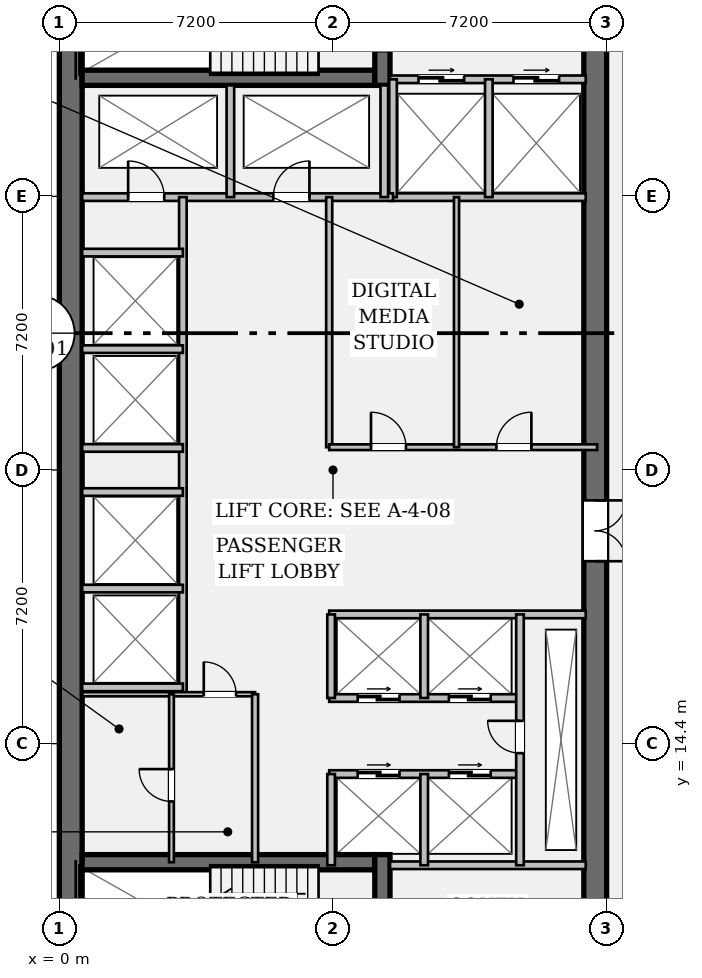
"""IFC4 building model, lengths in metres.
Left out: names, types, materials, properties, quantities, classifications, styles, units other than length and angle.
Written with IfcOpenShell. Run it as: python <this file> out.ifc"""

import sys

from ifc_helpers import new_model, si_unit, direction, frame, frame_2d, origin, place, context, subcontext, project, spatial, rectangle, extrude, element, fill, save


model = new_model("IFC4")
c1 = context("Model", 3, precision=1e-05, world=origin(), true_north=direction((0.0, 1.0)))
c2 = subcontext(c1, "Body", "Model", "MODEL_VIEW")
j1 = project(units=[si_unit("LENGTHUNIT", "METRE"), si_unit("PLANEANGLEUNIT", "RADIAN")], contexts=[c1])
p1 = place(None, origin())
s1 = spatial("IfcSite", under=j1, at=p1, CompositionType="ELEMENT")
p2 = place(p1, origin())
s2 = spatial("IfcBuilding", under=s1, at=p2, CompositionType="ELEMENT")
p3 = place(p2, frame((0.0, 0.0, 109.9)))
s3 = spatial("IfcBuildingStorey", under=s2, at=p3, CompositionType="ELEMENT", Elevation=109.9)
p4 = place(p3, frame((0.3, 7.2, 0.0), z_axis=(0.0, 0.0, 1.0), x_axis=(0.0, 1.0, 0.0)))
e1 = element("IfcWall", 1, at=p4, inside=s3, PredefinedType="SHEAR", context=c2, shape_type="SweptSolid", body=[
    extrude(rectangle(XDim=28.8, YDim=0.6, at=frame_2d((14.4, 0.0))), origin(), (0.0, 0.0, 1.0), 3.58),
])
p5 = place(p3, frame((14.1, 35.4, 0.0), z_axis=(0.0, 0.0, 1.0), x_axis=(0.0, -1.0, 0.0)))
e2 = element("IfcWall", 2, at=p5, inside=s3, PredefinedType="SHEAR", context=c2, shape_type="SweptSolid", body=[
    extrude(rectangle(XDim=27.6, YDim=0.6, at=frame_2d((13.8, 0.0))), origin(), (0.0, 0.0, 1.0), 3.58),
])
p6 = place(p5, frame((1.3, 0.0, 0.0)))
e3 = element("IfcOpeningElement", 3, at=p6, cuts=e2, PredefinedType="OPENING", context=c2, shape_type="SweptSolid", body=[
    extrude(rectangle(XDim=1.2, YDim=2.15, at=frame_2d((0.6, 1.075))), frame((0.0, 0.312, 0.0), z_axis=(0.0, -1.0, 0.0), x_axis=(1.0, 0.0, 0.0)), (0.0, 0.0, 1.0), 0.624),
])
p7 = place(p5, frame((25.25, 0.0, 0.0)))
e4 = element("IfcOpeningElement", 4, at=p7, cuts=e2, PredefinedType="OPENING", context=c2, shape_type="SweptSolid", body=[
    extrude(rectangle(XDim=1.2, YDim=2.15, at=frame_2d((0.6, 1.075))), frame((0.0, 0.312, 0.0), z_axis=(0.0, -1.0, 0.0), x_axis=(1.0, 0.0, 0.0)), (0.0, 0.0, 1.0), 0.624),
])
p8 = place(p5, frame((14.6, 0.0, 0.0)))
e5 = element("IfcOpeningElement", 5, at=p8, cuts=e2, PredefinedType="OPENING", context=c2, shape_type="SweptSolid", body=[
    extrude(rectangle(XDim=1.6, YDim=2.2, at=frame_2d((0.8, 1.1))), frame((0.0, 0.312, 0.0), z_axis=(0.0, -1.0, 0.0), x_axis=(1.0, 0.0, 0.0)), (0.0, 0.0, 1.0), 0.624),
])
for number, where, z_axis, x_axis in (
    (6, (0.6, 31.92, 0.0), (0.0, 0.0, 1.0), (1.0, 0.0, 0.0)),
    (7, (0.6, 11.28, 0.0), (0.0, 0.0, 1.0), (1.0, 0.0, 0.0)),
):
    element("IfcWall", number, at=place(p3, frame(where, z_axis=z_axis, x_axis=x_axis)), inside=s3, PredefinedType="SHEAR", context=c2, shape_type="SweptSolid", body=[
        extrude(rectangle(XDim=7.7, YDim=0.4, at=frame_2d((3.85, 0.0))), origin(), (0.0, 0.0, 1.0), 3.58),
    ])
p9 = place(p3, frame((8.5, 31.72, 0.0), z_axis=(0.0, 0.0, 1.0), x_axis=(0.0, 1.0, 0.0)))
e8 = element("IfcWall", 8, at=p9, inside=s3, PredefinedType="SHEAR", context=c2, shape_type="SweptSolid", body=[
    extrude(rectangle(XDim=3.68, YDim=0.4, at=frame_2d((1.84, 0.0))), origin(), (0.0, 0.0, 1.0), 3.58),
])
p10 = place(p9, frame((0.9, 0.0, 0.0)))
e9 = element("IfcOpeningElement", 9, at=p10, cuts=e8, PredefinedType="OPENING", context=c2, shape_type="SweptSolid", body=[
    extrude(rectangle(XDim=1.1, YDim=2.15, at=frame_2d((0.55, 1.075))), frame((0.0, 0.212, 0.0), z_axis=(0.0, -1.0, 0.0), x_axis=(1.0, 0.0, 0.0)), (0.0, 0.0, 1.0), 0.424),
])
p11 = place(p3, frame((8.5, 7.8, 0.0), z_axis=(0.0, 0.0, 1.0), x_axis=(0.0, 1.0, 0.0)))
e10 = element("IfcWall", 10, at=p11, inside=s3, PredefinedType="SHEAR", context=c2, shape_type="SweptSolid", body=[
    extrude(rectangle(XDim=3.68, YDim=0.4, at=frame_2d((1.84, 0.0))), origin(), (0.0, 0.0, 1.0), 3.58),
])
p12 = place(p11, frame((0.85, 0.0, 0.0)))
e11 = element("IfcOpeningElement", 11, at=p12, cuts=e10, PredefinedType="OPENING", context=c2, shape_type="SweptSolid", body=[
    extrude(rectangle(XDim=1.1, YDim=2.15, at=frame_2d((0.55, 1.075))), frame((0.0, 0.212, 0.0), z_axis=(0.0, -1.0, 0.0), x_axis=(1.0, 0.0, 0.0)), (0.0, 0.0, 1.0), 0.424),
])
p13 = place(p3, frame((8.7, 31.88, 0.0), z_axis=(0.0, 0.0, 1.0), x_axis=(1.0, 0.0, 0.0)))
e12 = element("IfcWall", 12, at=p13, inside=s3, PredefinedType="PARTITIONING", context=c2, shape_type="SweptSolid", body=[
    extrude(rectangle(XDim=5.15, YDim=0.2, at=frame_2d((2.575, 0.0))), origin(), (0.0, 0.0, 1.0), 3.58),
])
p14 = place(p13, frame((0.75, 0.0, 0.0)))
e13 = element("IfcOpeningElement", 13, at=p14, cuts=e12, PredefinedType="OPENING", context=c2, shape_type="SweptSolid", body=[
    extrude(rectangle(XDim=1.2, YDim=2.2, at=frame_2d((0.6, 1.1))), frame((0.0, 0.112, 0.0), z_axis=(0.0, -1.0, 0.0), x_axis=(1.0, 0.0, 0.0)), (0.0, 0.0, 1.0), 0.224),
])
p15 = place(p13, frame((3.25, 0.0, 0.0)))
e14 = element("IfcOpeningElement", 14, at=p15, cuts=e12, PredefinedType="OPENING", context=c2, shape_type="SweptSolid", body=[
    extrude(rectangle(XDim=1.2, YDim=2.2, at=frame_2d((0.6, 1.1))), frame((0.0, 0.112, 0.0), z_axis=(0.0, -1.0, 0.0), x_axis=(1.0, 0.0, 0.0)), (0.0, 0.0, 1.0), 0.224),
])
for number, where, z_axis, x_axis in (
    (15, (8.7, 11.2, 0.0), (0.0, 0.0, 1.0), (1.0, 0.0, 0.0)),
    (16, (8.7, 28.78, 0.0), (0.0, 0.0, 1.0), (1.0, 0.0, 0.0)),
):
    element("IfcWall", number, at=place(p3, frame(where, z_axis=z_axis, x_axis=x_axis)), inside=s3, PredefinedType="PARTITIONING", context=c2, shape_type="SweptSolid", body=[
        extrude(rectangle(XDim=5.15, YDim=0.2, at=frame_2d((2.575, 0.0))), origin(), (0.0, 0.0, 1.0), 3.58),
    ])
for number, where, z_axis, x_axis in (
    (17, (8.78, 28.78, 0.0), (0.0, 0.0, 1.0), (0.0, 1.0, 0.0)),
    (18, (11.3, 28.78, 0.0), (0.0, 0.0, 1.0), (0.0, 1.0, 0.0)),
):
    element("IfcWall", number, at=place(p3, frame(where, z_axis=z_axis, x_axis=x_axis)), inside=s3, PredefinedType="PARTITIONING", context=c2, shape_type="SweptSolid", body=[
        extrude(rectangle(XDim=3.1, YDim=0.2, at=frame_2d((1.55, 0.0))), origin(), (0.0, 0.0, 1.0), 3.58),
    ])
p16 = place(p3, frame((0.6, 28.78, 0.0), z_axis=(0.0, 0.0, 1.0), x_axis=(1.0, 0.0, 0.0)))
e19 = element("IfcWall", 19, at=p16, inside=s3, PredefinedType="PARTITIONING", context=c2, shape_type="SweptSolid", body=[
    extrude(rectangle(XDim=8.18, YDim=0.2, at=frame_2d((4.09, 0.0))), origin(), (0.0, 0.0, 1.0), 3.58),
])
p17 = place(p16, frame((1.21, 0.0, 0.0)))
e20 = element("IfcOpeningElement", 20, at=p17, cuts=e19, PredefinedType="OPENING", context=c2, shape_type="SweptSolid", body=[
    extrude(rectangle(XDim=0.95, YDim=2.15, at=frame_2d((0.475, 1.075))), frame((0.0, 0.112, 0.0), z_axis=(0.0, -1.0, 0.0), x_axis=(1.0, 0.0, 0.0)), (0.0, 0.0, 1.0), 0.224),
])
p18 = place(p16, frame((5.03, 0.0, 0.0)))
e21 = element("IfcOpeningElement", 21, at=p18, cuts=e19, PredefinedType="OPENING", context=c2, shape_type="SweptSolid", body=[
    extrude(rectangle(XDim=0.95, YDim=2.15, at=frame_2d((0.475, 1.075))), frame((0.0, 0.112, 0.0), z_axis=(0.0, -1.0, 0.0), x_axis=(1.0, 0.0, 0.0)), (0.0, 0.0, 1.0), 0.224),
])
for number, where, z_axis, x_axis in (
    (22, (4.5, 28.78, 0.0), (0.0, 0.0, 1.0), (0.0, 1.0, 0.0)),
    (23, (8.55, 28.78, 0.0), (0.0, 0.0, 1.0), (0.0, 1.0, 0.0)),
):
    element("IfcWall", number, at=place(p3, frame(where, z_axis=z_axis, x_axis=x_axis)), inside=s3, PredefinedType="PARTITIONING", context=c2, shape_type="SweptSolid", body=[
        extrude(rectangle(XDim=2.94, YDim=0.2, at=frame_2d((1.47, 0.0))), origin(), (0.0, 0.0, 1.0), 3.58),
    ])
p19 = place(p3, frame((3.25, 15.7, 0.0), z_axis=(0.0, 0.0, 1.0), x_axis=(0.0, 1.0, 0.0)))
e24 = element("IfcWall", 24, at=p19, inside=s3, PredefinedType="PARTITIONING", context=c2, shape_type="SweptSolid", body=[
    extrude(rectangle(XDim=13.08, YDim=0.2, at=frame_2d((6.54, 0.0))), origin(), (0.0, 0.0, 1.0), 3.58),
])
for number, where, z_axis, x_axis in (
    (25, (0.6, 15.88, 0.0), (0.0, 0.0, 1.0), (1.0, 0.0, 0.0)),
    (26, (0.6, 18.48, 0.0), (0.0, 0.0, 1.0), (1.0, 0.0, 0.0)),
    (27, (0.6, 22.18, 0.0), (0.0, 0.0, 1.0), (1.0, 0.0, 0.0)),
    (28, (0.6, 24.78, 0.0), (0.0, 0.0, 1.0), (1.0, 0.0, 0.0)),
    (29, (0.6, 21.02, 0.0), (0.0, 0.0, 1.0), (1.0, 0.0, 0.0)),
    (30, (0.6, 27.32, 0.0), (0.0, 0.0, 1.0), (1.0, 0.0, 0.0)),
):
    element("IfcWall", number, at=place(p3, frame(where, z_axis=z_axis, x_axis=x_axis)), inside=s3, PredefinedType="PARTITIONING", context=c2, shape_type="SweptSolid", body=[
        extrude(rectangle(XDim=2.65, YDim=0.2, at=frame_2d((1.325, 0.0))), origin(), (0.0, 0.0, 1.0), 3.58),
    ])
p20 = place(p3, frame((7.1, 22.2, 0.0), z_axis=(0.0, 0.0, 1.0), x_axis=(0.0, 1.0, 0.0)))
e31 = element("IfcWall", 31, at=p20, inside=s3, PredefinedType="PARTITIONING", context=c2, shape_type="SweptSolid", body=[
    extrude(rectangle(XDim=6.58, YDim=0.16, at=frame_2d((3.29, 0.0))), origin(), (0.0, 0.0, 1.0), 3.58),
])
p21 = place(p3, frame((7.1, 22.2, 0.0), z_axis=(0.0, 0.0, 1.0), x_axis=(1.0, 0.0, 0.0)))
e32 = element("IfcWall", 32, at=p21, inside=s3, PredefinedType="PARTITIONING", context=c2, shape_type="SweptSolid", body=[
    extrude(rectangle(XDim=7.05, YDim=0.15, at=frame_2d((3.525, 0.0))), origin(), (0.0, 0.0, 1.0), 3.58),
])
p22 = place(p21, frame((1.1, 0.0, 0.0)))
e33 = element("IfcOpeningElement", 33, at=p22, cuts=e32, PredefinedType="OPENING", context=c2, shape_type="SweptSolid", body=[
    extrude(rectangle(XDim=0.92, YDim=2.15, at=frame_2d((0.46, 1.075))), frame((0.0, 0.087, 0.0), z_axis=(0.0, -1.0, 0.0), x_axis=(1.0, 0.0, 0.0)), (0.0, 0.0, 1.0), 0.174),
])
p23 = place(p21, frame((4.4, 0.0, 0.0)))
e34 = element("IfcOpeningElement", 34, at=p23, cuts=e32, PredefinedType="OPENING", context=c2, shape_type="SweptSolid", body=[
    extrude(rectangle(XDim=0.92, YDim=2.15, at=frame_2d((0.46, 1.075))), frame((0.0, 0.087, 0.0), z_axis=(0.0, -1.0, 0.0), x_axis=(1.0, 0.0, 0.0)), (0.0, 0.0, 1.0), 0.174),
])
p24 = place(p3, frame((10.45, 22.2, 0.0), z_axis=(0.0, 0.0, 1.0), x_axis=(0.0, 1.0, 0.0)))
e35 = element("IfcWall", 35, at=p24, inside=s3, PredefinedType="PARTITIONING", context=c2, shape_type="SweptSolid", body=[
    extrude(rectangle(XDim=6.58, YDim=0.135, at=frame_2d((3.29, 0.0))), origin(), (0.0, 0.0, 1.0), 3.58),
])
p25 = place(p3, frame((7.1, 17.8, 0.0), z_axis=(0.0, 0.0, 1.0), x_axis=(1.0, 0.0, 0.0)))
e36 = element("IfcWall", 36, at=p25, inside=s3, PredefinedType="PARTITIONING", context=c2, shape_type="SweptSolid", body=[
    extrude(rectangle(XDim=6.75, YDim=0.2, at=frame_2d((3.375, 0.0))), origin(), (0.0, 0.0, 1.0), 3.58),
])
p26 = place(p3, frame((7.1, 15.6, 0.0), z_axis=(0.0, 0.0, 1.0), x_axis=(1.0, 0.0, 0.0)))
e37 = element("IfcWall", 37, at=p26, inside=s3, PredefinedType="PARTITIONING", context=c2, shape_type="SweptSolid", body=[
    extrude(rectangle(XDim=5.02, YDim=0.2, at=frame_2d((2.51, 0.0))), origin(), (0.0, 0.0, 1.0), 3.58),
])
p27 = place(p26, frame((0.75, 0.0, 0.0)))
e38 = element("IfcOpeningElement", 38, at=p27, cuts=e37, PredefinedType="OPENING", context=c2, shape_type="SweptSolid", body=[
    extrude(rectangle(XDim=1.1, YDim=2.2, at=frame_2d((0.55, 1.1))), frame((0.0, 0.112, 0.0), z_axis=(0.0, -1.0, 0.0), x_axis=(1.0, 0.0, 0.0)), (0.0, 0.0, 1.0), 0.224),
])
p28 = place(p26, frame((3.15, 0.0, 0.0)))
e39 = element("IfcOpeningElement", 39, at=p28, cuts=e37, PredefinedType="OPENING", context=c2, shape_type="SweptSolid", body=[
    extrude(rectangle(XDim=1.1, YDim=2.2, at=frame_2d((0.55, 1.1))), frame((0.0, 0.112, 0.0), z_axis=(0.0, -1.0, 0.0), x_axis=(1.0, 0.0, 0.0)), (0.0, 0.0, 1.0), 0.224),
])
p29 = place(p3, frame((7.1, 13.6, 0.0), z_axis=(0.0, 0.0, 1.0), x_axis=(1.0, 0.0, 0.0)))
e40 = element("IfcWall", 40, at=p29, inside=s3, PredefinedType="PARTITIONING", context=c2, shape_type="SweptSolid", body=[
    extrude(rectangle(XDim=5.02, YDim=0.2, at=frame_2d((2.51, 0.0))), origin(), (0.0, 0.0, 1.0), 3.58),
])
p30 = place(p29, frame((0.75, 0.0, 0.0)))
e41 = element("IfcOpeningElement", 41, at=p30, cuts=e40, PredefinedType="OPENING", context=c2, shape_type="SweptSolid", body=[
    extrude(rectangle(XDim=1.1, YDim=2.2, at=frame_2d((0.55, 1.1))), frame((0.0, 0.112, 0.0), z_axis=(0.0, -1.0, 0.0), x_axis=(1.0, 0.0, 0.0)), (0.0, 0.0, 1.0), 0.224),
])
p31 = place(p29, frame((3.15, 0.0, 0.0)))
e42 = element("IfcOpeningElement", 42, at=p31, cuts=e40, PredefinedType="OPENING", context=c2, shape_type="SweptSolid", body=[
    extrude(rectangle(XDim=1.1, YDim=2.2, at=frame_2d((0.55, 1.1))), frame((0.0, 0.112, 0.0), z_axis=(0.0, -1.0, 0.0), x_axis=(1.0, 0.0, 0.0)), (0.0, 0.0, 1.0), 0.224),
])
p32 = place(p3, frame((7.15, 15.6, 0.0), z_axis=(0.0, 0.0, 1.0), x_axis=(0.0, 1.0, 0.0)))
e43 = element("IfcWall", 43, at=p32, inside=s3, PredefinedType="PARTITIONING", context=c2, shape_type="SweptSolid", body=[
    extrude(rectangle(XDim=2.2, YDim=0.2, at=frame_2d((1.1, 0.0))), origin(), (0.0, 0.0, 1.0), 3.58),
])
p33 = place(p3, frame((7.15, 11.2, 0.0), z_axis=(0.0, 0.0, 1.0), x_axis=(0.0, 1.0, 0.0)))
e44 = element("IfcWall", 44, at=p33, inside=s3, PredefinedType="PARTITIONING", context=c2, shape_type="SweptSolid", body=[
    extrude(rectangle(XDim=2.4, YDim=0.2, at=frame_2d((1.2, 0.0))), origin(), (0.0, 0.0, 1.0), 3.58),
])
p34 = place(p3, frame((9.6, 15.6, 0.0), z_axis=(0.0, 0.0, 1.0), x_axis=(0.0, 1.0, 0.0)))
e45 = element("IfcWall", 45, at=p34, inside=s3, PredefinedType="PARTITIONING", context=c2, shape_type="SweptSolid", body=[
    extrude(rectangle(XDim=2.2, YDim=0.2, at=frame_2d((1.1, 0.0))), origin(), (0.0, 0.0, 1.0), 3.58),
])
p35 = place(p3, frame((9.6, 11.2, 0.0), z_axis=(0.0, 0.0, 1.0), x_axis=(0.0, 1.0, 0.0)))
e46 = element("IfcWall", 46, at=p35, inside=s3, PredefinedType="PARTITIONING", context=c2, shape_type="SweptSolid", body=[
    extrude(rectangle(XDim=2.4, YDim=0.2, at=frame_2d((1.2, 0.0))), origin(), (0.0, 0.0, 1.0), 3.58),
])
p36 = place(p3, frame((12.12, 11.2, 0.0), z_axis=(0.0, 0.0, 1.0), x_axis=(0.0, 1.0, 0.0)))
e47 = element("IfcWall", 47, at=p36, inside=s3, PredefinedType="PARTITIONING", context=c2, shape_type="SweptSolid", body=[
    extrude(rectangle(XDim=6.6, YDim=0.2, at=frame_2d((3.3, 0.0))), origin(), (0.0, 0.0, 1.0), 3.58),
])
p37 = place(p36, frame((2.95, 0.0, 0.0)))
e48 = element("IfcOpeningElement", 48, at=p37, cuts=e47, PredefinedType="OPENING", context=c2, shape_type="SweptSolid", body=[
    extrude(rectangle(XDim=0.85, YDim=2.15, at=frame_2d((0.425, 1.075))), frame((0.0, 0.112, 0.0), z_axis=(0.0, -1.0, 0.0), x_axis=(1.0, 0.0, 0.0)), (0.0, 0.0, 1.0), 0.224),
])
p38 = place(p3, frame((0.6, 15.7, 0.0), z_axis=(0.0, 0.0, 1.0), x_axis=(1.0, 0.0, 0.0)))
e49 = element("IfcWall", 49, at=p38, inside=s3, PredefinedType="PARTITIONING", context=c2, shape_type="SweptSolid", body=[
    extrude(rectangle(XDim=4.55, YDim=0.11, at=frame_2d((2.275, 0.0))), origin(), (0.0, 0.0, 1.0), 3.58),
])
p39 = place(p38, frame((3.2, 0.0, 0.0)))
e50 = element("IfcOpeningElement", 50, at=p39, cuts=e49, PredefinedType="OPENING", context=c2, shape_type="SweptSolid", body=[
    extrude(rectangle(XDim=0.85, YDim=2.15, at=frame_2d((0.425, 1.075))), frame((0.0, 0.067, 0.0), z_axis=(0.0, -1.0, 0.0), x_axis=(1.0, 0.0, 0.0)), (0.0, 0.0, 1.0), 0.134),
])
p40 = place(p3, frame((5.15, 11.28, 0.0), z_axis=(0.0, 0.0, 1.0), x_axis=(0.0, 1.0, 0.0)))
e51 = element("IfcWall", 51, at=p40, inside=s3, PredefinedType="PARTITIONING", context=c2, shape_type="SweptSolid", body=[
    extrude(rectangle(XDim=4.42, YDim=0.16, at=frame_2d((2.21, 0.0))), origin(), (0.0, 0.0, 1.0), 3.58),
])
p41 = place(p3, frame((2.95, 11.28, 0.0), z_axis=(0.0, 0.0, 1.0), x_axis=(0.0, 1.0, 0.0)))
e52 = element("IfcWall", 52, at=p41, inside=s3, PredefinedType="PARTITIONING", context=c2, shape_type="SweptSolid", body=[
    extrude(rectangle(XDim=4.42, YDim=0.125, at=frame_2d((2.21, 0.0))), origin(), (0.0, 0.0, 1.0), 3.58),
])
p42 = place(p41, frame((1.6, 0.0, 0.0)))
e53 = element("IfcOpeningElement", 53, at=p42, cuts=e52, PredefinedType="OPENING", context=c2, shape_type="SweptSolid", body=[
    extrude(rectangle(XDim=0.85, YDim=2.15, at=frame_2d((0.425, 1.075))), frame((0.0, 0.074, 0.0), z_axis=(0.0, -1.0, 0.0), x_axis=(1.0, 0.0, 0.0)), (0.0, 0.0, 1.0), 0.149),
])
p43 = place(p14, origin())
e54 = element("IfcDoor", 54, at=p43, inside=s3, OperationType="DOUBLE_DOOR_SLIDING", PredefinedType="DOOR", context=c2, shape_type="SweptSolid", body=[
    extrude(rectangle(XDim=1.2, YDim=2.2, at=frame_2d((0.6, 1.1))), frame((0.0, 0.025, 0.0), z_axis=(0.0, -1.0, 0.0), x_axis=(1.0, 0.0, 0.0)), (0.0, 0.0, 1.0), 0.05),
])
fill(e13, e54)
p44 = place(p15, origin())
e55 = element("IfcDoor", 55, at=p44, inside=s3, OperationType="DOUBLE_DOOR_SLIDING", PredefinedType="DOOR", context=c2, shape_type="SweptSolid", body=[
    extrude(rectangle(XDim=1.2, YDim=2.2, at=frame_2d((0.6, 1.1))), frame((0.0, 0.025, 0.0), z_axis=(0.0, -1.0, 0.0), x_axis=(1.0, 0.0, 0.0)), (0.0, 0.0, 1.0), 0.05),
])
fill(e14, e55)
p45 = place(p17, origin())
e56 = element("IfcDoor", 56, at=p45, inside=s3, OperationType="SINGLE_SWING_LEFT", PredefinedType="DOOR", context=c2, shape_type="SweptSolid", body=[
    extrude(rectangle(XDim=0.95, YDim=2.15, at=frame_2d((0.475, 1.075))), frame((0.0, 0.025, 0.0), z_axis=(0.0, -1.0, 0.0), x_axis=(1.0, 0.0, 0.0)), (0.0, 0.0, 1.0), 0.05),
])
fill(e20, e56)
p46 = place(p18, origin())
e57 = element("IfcDoor", 57, at=p46, inside=s3, OperationType="SINGLE_SWING_RIGHT", PredefinedType="DOOR", context=c2, shape_type="SweptSolid", body=[
    extrude(rectangle(XDim=0.95, YDim=2.15, at=frame_2d((0.475, 1.075))), frame((0.0, 0.025, 0.0), z_axis=(0.0, -1.0, 0.0), x_axis=(1.0, 0.0, 0.0)), (0.0, 0.0, 1.0), 0.05),
])
fill(e21, e57)
p47 = place(p8, origin())
e58 = element("IfcDoor", 58, at=p47, inside=s3, OperationType="DOUBLE_DOOR_SINGLE_SWING", PredefinedType="DOOR", context=c2, shape_type="SweptSolid", body=[
    extrude(rectangle(XDim=1.6, YDim=2.2, at=frame_2d((0.8, 1.1))), frame((0.0, 0.025, 0.0), z_axis=(0.0, -1.0, 0.0), x_axis=(1.0, 0.0, 0.0)), (0.0, 0.0, 1.0), 0.05),
])
fill(e5, e58)
p48 = place(p22, origin())
e59 = element("IfcDoor", 59, at=p48, inside=s3, OperationType="SINGLE_SWING_LEFT", PredefinedType="DOOR", context=c2, shape_type="SweptSolid", body=[
    extrude(rectangle(XDim=0.92, YDim=2.15, at=frame_2d((0.46, 1.075))), frame((0.0, 0.025, 0.0), z_axis=(0.0, -1.0, 0.0), x_axis=(1.0, 0.0, 0.0)), (0.0, 0.0, 1.0), 0.05),
])
fill(e33, e59)
p49 = place(p23, origin())
e60 = element("IfcDoor", 60, at=p49, inside=s3, OperationType="SINGLE_SWING_RIGHT", PredefinedType="DOOR", context=c2, shape_type="SweptSolid", body=[
    extrude(rectangle(XDim=0.92, YDim=2.15, at=frame_2d((0.46, 1.075))), frame((0.0, 0.025, 0.0), z_axis=(0.0, -1.0, 0.0), x_axis=(1.0, 0.0, 0.0)), (0.0, 0.0, 1.0), 0.05),
])
fill(e34, e60)
p50 = place(p37, origin())
e61 = element("IfcDoor", 61, at=p50, inside=s3, OperationType="SINGLE_SWING_RIGHT", PredefinedType="DOOR", context=c2, shape_type="SweptSolid", body=[
    extrude(rectangle(XDim=0.85, YDim=2.15, at=frame_2d((0.425, 1.075))), frame((0.0, 0.025, 0.0), z_axis=(0.0, -1.0, 0.0), x_axis=(1.0, 0.0, 0.0)), (0.0, 0.0, 1.0), 0.05),
])
fill(e48, e61)
p51 = place(p27, origin())
e62 = element("IfcDoor", 62, at=p51, inside=s3, OperationType="DOUBLE_DOOR_SLIDING", PredefinedType="DOOR", context=c2, shape_type="SweptSolid", body=[
    extrude(rectangle(XDim=1.1, YDim=2.2, at=frame_2d((0.55, 1.1))), frame((0.0, 0.025, 0.0), z_axis=(0.0, -1.0, 0.0), x_axis=(1.0, 0.0, 0.0)), (0.0, 0.0, 1.0), 0.05),
])
fill(e38, e62)
p52 = place(p28, origin())
e63 = element("IfcDoor", 63, at=p52, inside=s3, OperationType="DOUBLE_DOOR_SLIDING", PredefinedType="DOOR", context=c2, shape_type="SweptSolid", body=[
    extrude(rectangle(XDim=1.1, YDim=2.2, at=frame_2d((0.55, 1.1))), frame((0.0, 0.025, 0.0), z_axis=(0.0, -1.0, 0.0), x_axis=(1.0, 0.0, 0.0)), (0.0, 0.0, 1.0), 0.05),
])
fill(e39, e63)
p53 = place(p30, origin())
e64 = element("IfcDoor", 64, at=p53, inside=s3, OperationType="DOUBLE_DOOR_SLIDING", PredefinedType="DOOR", context=c2, shape_type="SweptSolid", body=[
    extrude(rectangle(XDim=1.1, YDim=2.2, at=frame_2d((0.55, 1.1))), frame((0.0, 0.025, 0.0), z_axis=(0.0, -1.0, 0.0), x_axis=(1.0, 0.0, 0.0)), (0.0, 0.0, 1.0), 0.05),
])
fill(e41, e64)
p54 = place(p31, origin())
e65 = element("IfcDoor", 65, at=p54, inside=s3, OperationType="DOUBLE_DOOR_SLIDING", PredefinedType="DOOR", context=c2, shape_type="SweptSolid", body=[
    extrude(rectangle(XDim=1.1, YDim=2.2, at=frame_2d((0.55, 1.1))), frame((0.0, 0.025, 0.0), z_axis=(0.0, -1.0, 0.0), x_axis=(1.0, 0.0, 0.0)), (0.0, 0.0, 1.0), 0.05),
])
fill(e42, e65)
p55 = place(p39, origin())
e66 = element("IfcDoor", 66, at=p55, inside=s3, OperationType="SINGLE_SWING_LEFT", PredefinedType="DOOR", context=c2, shape_type="SweptSolid", body=[
    extrude(rectangle(XDim=0.85, YDim=2.15, at=frame_2d((0.425, 1.075))), frame((0.0, 0.025, 0.0), z_axis=(0.0, -1.0, 0.0), x_axis=(1.0, 0.0, 0.0)), (0.0, 0.0, 1.0), 0.05),
])
fill(e50, e66)
p56 = place(p42, origin())
e67 = element("IfcDoor", 67, at=p56, inside=s3, OperationType="SINGLE_SWING_RIGHT", PredefinedType="DOOR", context=c2, shape_type="SweptSolid", body=[
    extrude(rectangle(XDim=0.85, YDim=2.15, at=frame_2d((0.425, 1.075))), frame((0.0, 0.025, 0.0), z_axis=(0.0, -1.0, 0.0), x_axis=(1.0, 0.0, 0.0)), (0.0, 0.0, 1.0), 0.05),
])
fill(e53, e67)
save(model, sys.argv[1])
